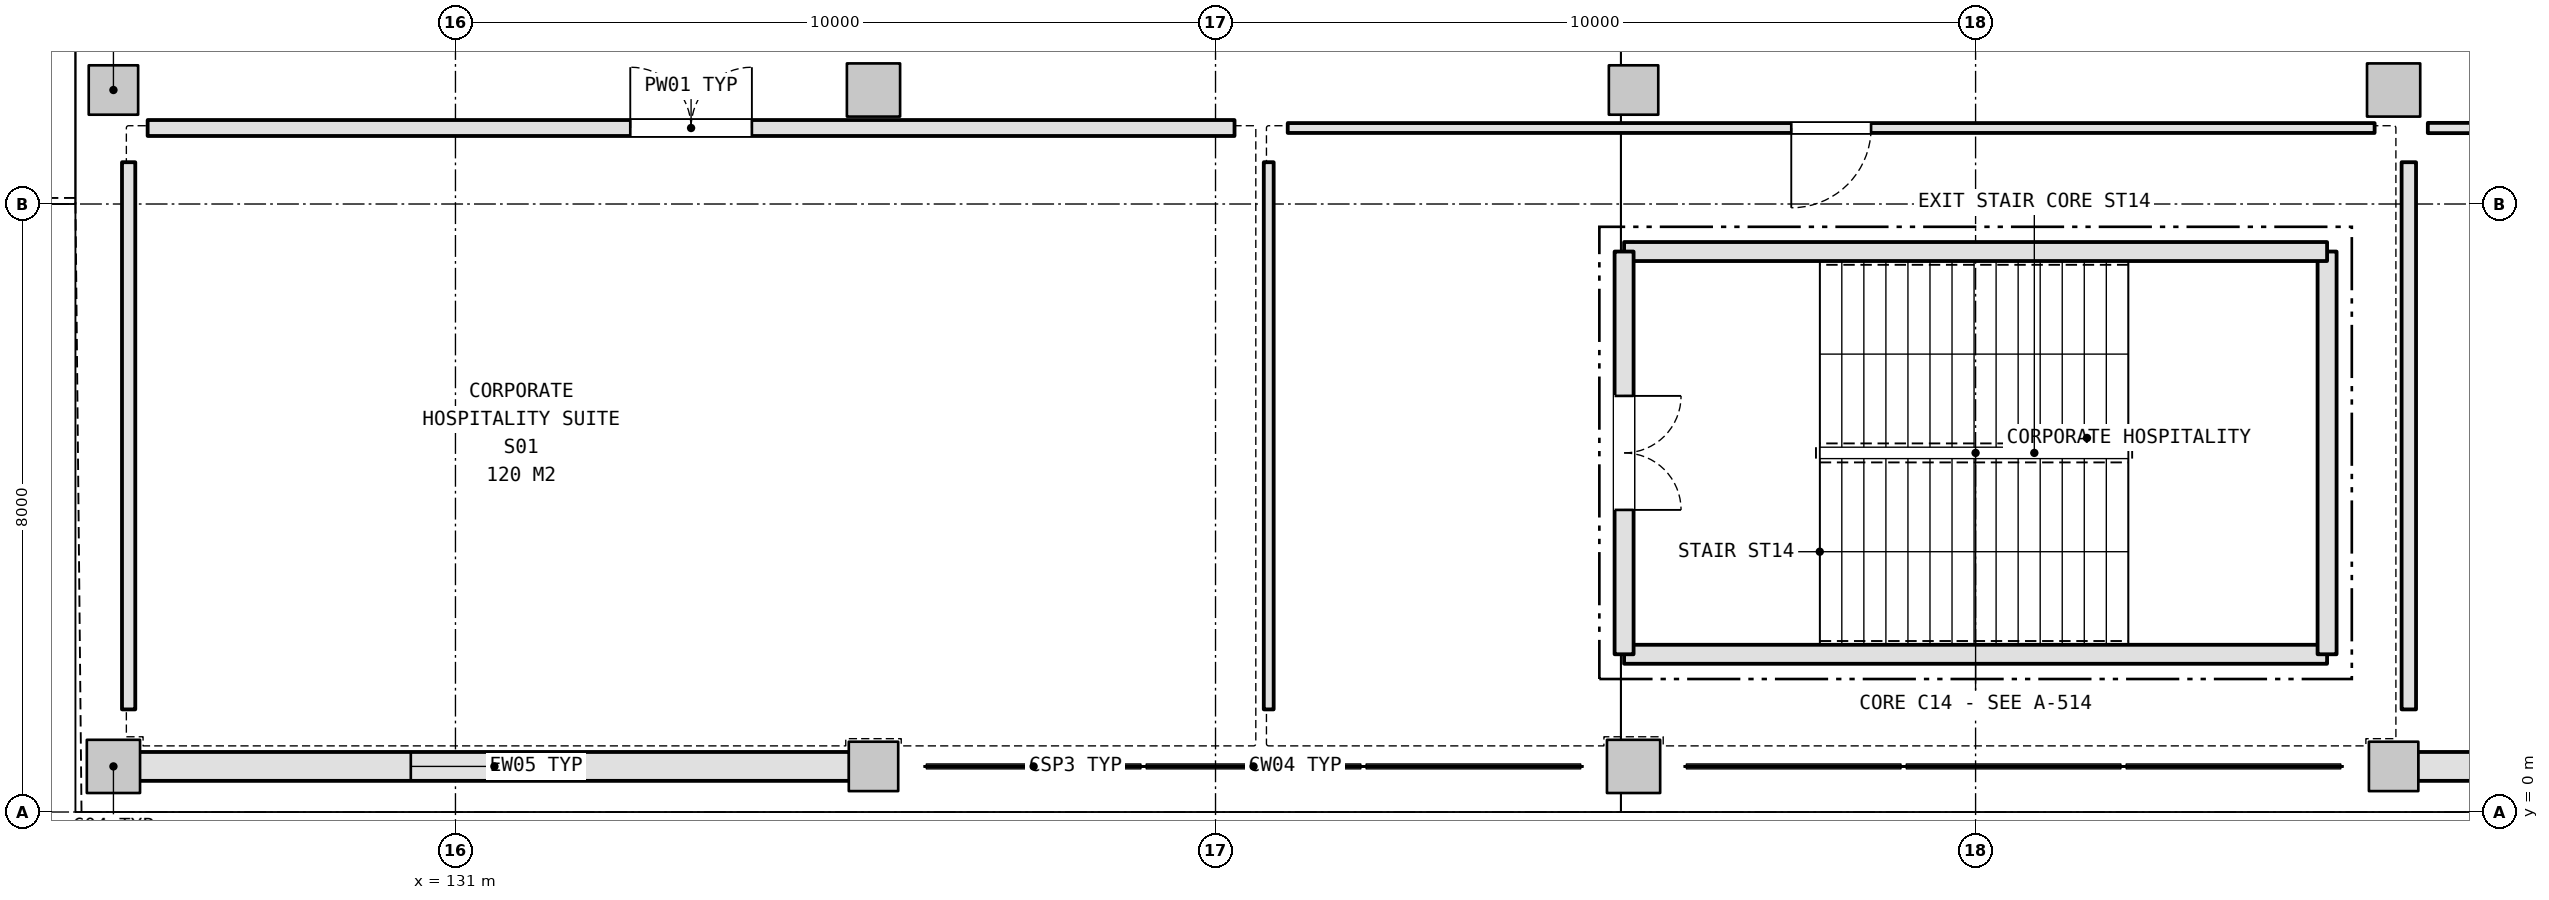
"""IFC4 building model, lengths in metres.
Left out: names, types, materials, properties, quantities, classifications, styles, units other than length and angle.
Written with IfcOpenShell. Run it as: python <this file> out.ifc"""

import sys

from ifc_helpers import new_model, si_unit, direction, frame, frame_2d, origin, origin_2d, place, context, subcontext, project, spatial, rectangle, extrude, element, fill, save


model = new_model("IFC4")
c1 = context("Model", 3, precision=1e-05, world=origin(), true_north=direction((0.0, 1.0)))
c2 = subcontext(c1, "Body", "Model", "MODEL_VIEW")
j1 = project(units=[si_unit("LENGTHUNIT", "METRE"), si_unit("PLANEANGLEUNIT", "RADIAN")], contexts=[c1])
p1 = place(None, origin())
s1 = spatial("IfcSite", under=j1, at=p1, CompositionType="ELEMENT")
p2 = place(p1, origin())
s2 = spatial("IfcBuilding", under=s1, at=p2, CompositionType="ELEMENT")
p3 = place(p2, frame((0.0, 0.0, 10.8)))
s3 = spatial("IfcBuildingStorey", under=s2, at=p3, CompositionType="ELEMENT", Elevation=10.8)
p4 = place(p3, frame((126.5, 0.6, 0.0), z_axis=(0.0, 0.0, 1.0), x_axis=(1.0, 0.0, 0.0)))
e1 = element("IfcColumn", 1, at=p4, inside=s3, PredefinedType="COLUMN", context=c2, shape_type="SweptSolid", body=[
    extrude(rectangle(XDim=0.7, YDim=0.7, at=origin_2d()), origin(), (0.0, 0.0, 1.0), 5.4),
])
for number, where, z_axis, x_axis in (
    (2, (126.5, 9.5, 0.0), (0.0, 0.0, 1.0), (1.0, 0.0, 0.0)),
    (3, (136.5, 0.6, 0.0), (0.0, 0.0, 1.0), (1.0, 0.0, 0.0)),
):
    element("IfcColumn", number, at=place(p3, frame(where, z_axis=z_axis, x_axis=x_axis)), inside=s3, PredefinedType="COLUMN", context=c2, shape_type="SweptSolid", body=[
        extrude(rectangle(XDim=0.65, YDim=0.65, at=origin_2d()), origin(), (0.0, 0.0, 1.0), 5.4),
    ])
for number, where, z_axis, x_axis in (
    (4, (136.5, 9.5, 0.0), (0.0, 0.0, 1.0), (1.0, 0.0, 0.0)),
    (5, (146.5, 0.6, 0.0), (0.0, 0.0, 1.0), (1.0, 0.0, 0.0)),
):
    element("IfcColumn", number, at=place(p3, frame(where, z_axis=z_axis, x_axis=x_axis)), inside=s3, PredefinedType="COLUMN", context=c2, shape_type="SweptSolid", body=[
        extrude(rectangle(XDim=0.7, YDim=0.7, at=origin_2d()), origin(), (0.0, 0.0, 1.0), 5.4),
    ])
for number, where, z_axis, x_axis in (
    (6, (146.5, 9.5, 0.0), (0.0, 0.0, 1.0), (1.0, 0.0, 0.0)),
    (7, (156.5, 0.6, 0.0), (0.0, 0.0, 1.0), (1.0, 0.0, 0.0)),
):
    element("IfcColumn", number, at=place(p3, frame(where, z_axis=z_axis, x_axis=x_axis)), inside=s3, PredefinedType="COLUMN", context=c2, shape_type="SweptSolid", body=[
        extrude(rectangle(XDim=0.65, YDim=0.65, at=origin_2d()), origin(), (0.0, 0.0, 1.0), 5.4),
    ])
p5 = place(p3, frame((156.5, 9.5, 0.0), z_axis=(0.0, 0.0, 1.0), x_axis=(1.0, 0.0, 0.0)))
e8 = element("IfcColumn", 8, at=p5, inside=s3, PredefinedType="COLUMN", context=c2, shape_type="SweptSolid", body=[
    extrude(rectangle(XDim=0.7, YDim=0.7, at=origin_2d()), origin(), (0.0, 0.0, 1.0), 5.4),
])
p6 = place(p3, frame((126.838, 0.6, 0.0), z_axis=(0.0, 0.0, 1.0), x_axis=(1.0, 0.0, 0.0)))
e9 = element("IfcWall", 9, at=p6, inside=s3, PredefinedType="SOLIDWALL", context=c2, shape_type="SweptSolid", body=[
    extrude(rectangle(XDim=9.349, YDim=0.38, at=frame_2d((4.675, 0.0))), origin(), (0.0, 0.0, 1.0), 4.435),
])
p7 = place(p6, frame((3.574, 0.0, 1.05)))
e10 = element("IfcOpeningElement", 10, at=p7, cuts=e9, PredefinedType="OPENING", context=c2, shape_type="SweptSolid", body=[
    extrude(rectangle(XDim=2.2, YDim=1.8, at=frame_2d((1.1, 0.9))), frame((0.0, 0.2, 0.0), z_axis=(0.0, -1.0, 0.0), x_axis=(1.0, 0.0, 0.0)), (0.0, 0.0, 1.0), 0.4),
])
p8 = place(p3, frame((156.813, 0.6, 0.0), z_axis=(0.0, 0.0, 1.0), x_axis=(1.0, 0.0, 0.0)))
e11 = element("IfcWall", 11, at=p8, inside=s3, PredefinedType="SOLIDWALL", context=c2, shape_type="SweptSolid", body=[
    extrude(rectangle(XDim=9.349, YDim=0.38, at=frame_2d((4.675, 0.0))), origin(), (0.0, 0.0, 1.0), 4.435),
])
p9 = place(p8, frame((3.574, 0.0, 1.05)))
e12 = element("IfcOpeningElement", 12, at=p9, cuts=e11, PredefinedType="OPENING", context=c2, shape_type="SweptSolid", body=[
    extrude(rectangle(XDim=2.2, YDim=1.8, at=frame_2d((1.1, 0.9))), frame((0.0, 0.2, 0.0), z_axis=(0.0, -1.0, 0.0), x_axis=(1.0, 0.0, 0.0)), (0.0, 0.0, 1.0), 0.4),
])
p10 = place(p3, frame((146.375, 2.075, 0.0), z_axis=(0.0, 0.0, 1.0), x_axis=(1.0, 0.0, 0.0)))
e13 = element("IfcWall", 13, at=p10, inside=s3, PredefinedType="SHEAR", context=c2, shape_type="SweptSolid", body=[
    extrude(rectangle(XDim=9.249, YDim=0.25, at=frame_2d((4.625, 0.0))), origin(), (0.0, 0.0, 1.0), 5.15),
])
p11 = place(p3, frame((155.625, 2.075, 0.0), z_axis=(0.0, 0.0, 1.0), x_axis=(0.0, 1.0, 0.0)))
e14 = element("IfcWall", 14, at=p11, inside=s3, PredefinedType="SHEAR", context=c2, shape_type="SweptSolid", body=[
    extrude(rectangle(XDim=5.299, YDim=0.25, at=frame_2d((2.649, 0.0))), origin(), (0.0, 0.0, 1.0), 5.15),
])
p12 = place(p3, frame((155.625, 7.375, 0.0), z_axis=(0.0, 0.0, 1.0), x_axis=(-1.0, 0.0, 0.0)))
e15 = element("IfcWall", 15, at=p12, inside=s3, PredefinedType="SHEAR", context=c2, shape_type="SweptSolid", body=[
    extrude(rectangle(XDim=9.249, YDim=0.25, at=frame_2d((4.625, 0.0))), origin(), (0.0, 0.0, 1.0), 5.15),
])
p13 = place(p3, frame((146.375, 7.375, 0.0), z_axis=(0.0, 0.0, 1.0), x_axis=(0.0, -1.0, 0.0)))
e16 = element("IfcWall", 16, at=p13, inside=s3, PredefinedType="SHEAR", context=c2, shape_type="SweptSolid", body=[
    extrude(rectangle(XDim=5.299, YDim=0.25, at=frame_2d((2.649, 0.0))), origin(), (0.0, 0.0, 1.0), 5.15),
])
p14 = place(p13, frame((1.9, 0.0, 0.0)))
e17 = element("IfcOpeningElement", 17, at=p14, cuts=e16, PredefinedType="OPENING", context=c2, shape_type="SweptSolid", body=[
    extrude(rectangle(XDim=1.5, YDim=2.2, at=frame_2d((0.75, 1.1))), frame((0.0, 0.135, 0.0), z_axis=(0.0, -1.0, 0.0), x_axis=(1.0, 0.0, 0.0)), (0.0, 0.0, 1.0), 0.27),
])
p15 = place(p3, frame((126.95, 9.0, 0.0), z_axis=(0.0, 0.0, 1.0), x_axis=(1.0, 0.0, 0.0)))
e18 = element("IfcWall", 18, at=p15, inside=s3, PredefinedType="PLUMBINGWALL", context=c2, shape_type="SweptSolid", body=[
    extrude(rectangle(XDim=14.3, YDim=0.21, at=frame_2d((7.15, 0.0))), origin(), (0.0, 0.0, 1.0), 4.435),
])
p16 = place(p15, frame((6.35, 0.0, 0.0)))
e19 = element("IfcOpeningElement", 19, at=p16, cuts=e18, PredefinedType="OPENING", context=c2, shape_type="SweptSolid", body=[
    extrude(rectangle(XDim=1.6, YDim=2.2, at=frame_2d((0.8, 1.1))), frame((0.0, 0.115, 0.0), z_axis=(0.0, -1.0, 0.0), x_axis=(1.0, 0.0, 0.0)), (0.0, 0.0, 1.0), 0.23),
])
p17 = place(p3, frame((126.7, 1.35, 0.0), z_axis=(0.0, 0.0, 1.0), x_axis=(0.0, 1.0, 0.0)))
e20 = element("IfcWall", 20, at=p17, inside=s3, PredefinedType="PARTITIONING", context=c2, shape_type="SweptSolid", body=[
    extrude(rectangle(XDim=7.2, YDim=0.175, at=frame_2d((3.6, 0.0))), origin(), (0.0, 0.0, 1.0), 4.485),
])
p18 = place(p3, frame((141.95, 9.0, 0.0), z_axis=(0.0, 0.0, 1.0), x_axis=(1.0, 0.0, 0.0)))
e21 = element("IfcWall", 21, at=p18, inside=s3, PredefinedType="PARTITIONING", context=c2, shape_type="SweptSolid", body=[
    extrude(rectangle(XDim=14.3, YDim=0.13, at=frame_2d((7.15, 0.0))), origin(), (0.0, 0.0, 1.0), 4.435),
])
p19 = place(p18, frame((6.625, 0.0, 0.0)))
e22 = element("IfcOpeningElement", 22, at=p19, cuts=e21, PredefinedType="OPENING", context=c2, shape_type="SweptSolid", body=[
    extrude(rectangle(XDim=1.05, YDim=2.2, at=frame_2d((0.525, 1.1))), frame((0.0, 0.075, 0.0), z_axis=(0.0, -1.0, 0.0), x_axis=(1.0, 0.0, 0.0)), (0.0, 0.0, 1.0), 0.15),
])
p20 = place(p3, frame((141.7, 1.35, 0.0), z_axis=(0.0, 0.0, 1.0), x_axis=(0.0, 1.0, 0.0)))
e23 = element("IfcWall", 23, at=p20, inside=s3, PredefinedType="PARTITIONING", context=c2, shape_type="SweptSolid", body=[
    extrude(rectangle(XDim=7.2, YDim=0.13, at=frame_2d((3.6, 0.0))), origin(), (0.0, 0.0, 1.0), 5.12),
])
p21 = place(p3, frame((156.95, 9.0, 0.0), z_axis=(0.0, 0.0, 1.0), x_axis=(1.0, 0.0, 0.0)))
e24 = element("IfcWall", 24, at=p21, inside=s3, PredefinedType="PARTITIONING", context=c2, shape_type="SweptSolid", body=[
    extrude(rectangle(XDim=13.3, YDim=0.135, at=frame_2d((6.65, 0.0))), origin(), (0.0, 0.0, 1.0), 4.435),
])
p22 = place(p21, frame((6.0, 0.0, 0.0)))
e25 = element("IfcOpeningElement", 25, at=p22, cuts=e24, PredefinedType="OPENING", context=c2, shape_type="SweptSolid", body=[
    extrude(rectangle(XDim=1.3, YDim=2.2, at=frame_2d((0.65, 1.1))), frame((0.0, 0.077, 0.0), z_axis=(0.0, -1.0, 0.0), x_axis=(1.0, 0.0, 0.0)), (0.0, 0.0, 1.0), 0.155),
])
p23 = place(p3, frame((156.7, 1.35, 0.0), z_axis=(0.0, 0.0, 1.0), x_axis=(0.0, 1.0, 0.0)))
e26 = element("IfcWall", 26, at=p23, inside=s3, PredefinedType="PARTITIONING", context=c2, shape_type="SweptSolid", body=[
    extrude(rectangle(XDim=7.2, YDim=0.19, at=frame_2d((3.6, 0.0))), origin(), (0.0, 0.0, 1.0), 4.435),
])
p24 = place(p7, origin())
e27 = element("IfcWindow", 27, at=p24, inside=s3, PartitioningType="SINGLE_PANEL", PredefinedType="WINDOW", context=c2, shape_type="SweptSolid", body=[
    extrude(rectangle(XDim=2.2, YDim=1.8, at=frame_2d((1.1, 0.9))), frame((0.0, 0.03, 0.0), z_axis=(0.0, -1.0, 0.0), x_axis=(1.0, 0.0, 0.0)), (0.0, 0.0, 1.0), 0.06),
])
fill(e10, e27)
p25 = place(p14, origin())
e28 = element("IfcDoor", 28, at=p25, inside=s3, OperationType="DOUBLE_DOOR_SINGLE_SWING", PredefinedType="DOOR", context=c2, shape_type="SweptSolid", body=[
    extrude(rectangle(XDim=1.5, YDim=2.2, at=frame_2d((0.75, 1.1))), frame((0.0, 0.025, 0.0), z_axis=(0.0, -1.0, 0.0), x_axis=(1.0, 0.0, 0.0)), (0.0, 0.0, 1.0), 0.05),
])
fill(e17, e28)
p26 = place(p16, origin())
e29 = element("IfcDoor", 29, at=p26, inside=s3, OperationType="DOUBLE_DOOR_SINGLE_SWING", PredefinedType="DOOR", context=c2, shape_type="SweptSolid", body=[
    extrude(rectangle(XDim=1.6, YDim=2.2, at=frame_2d((0.8, 1.1))), frame((0.0, 0.025, 0.0), z_axis=(0.0, -1.0, 0.0), x_axis=(1.0, 0.0, 0.0)), (0.0, 0.0, 1.0), 0.05),
])
fill(e19, e29)
p27 = place(p19, frame((1.05, 0.0, 0.0), z_axis=(0.0, 0.0, 1.0), x_axis=(-1.0, 0.0, 0.0)))
e30 = element("IfcDoor", 30, at=p27, inside=s3, OperationType="SINGLE_SWING_LEFT", PredefinedType="DOOR", context=c2, shape_type="SweptSolid", body=[
    extrude(rectangle(XDim=1.05, YDim=2.2, at=frame_2d((0.525, 1.1))), frame((0.0, 0.025, 0.0), z_axis=(0.0, -1.0, 0.0), x_axis=(1.0, 0.0, 0.0)), (0.0, 0.0, 1.0), 0.05),
])
fill(e22, e30)
save(model, sys.argv[1])
